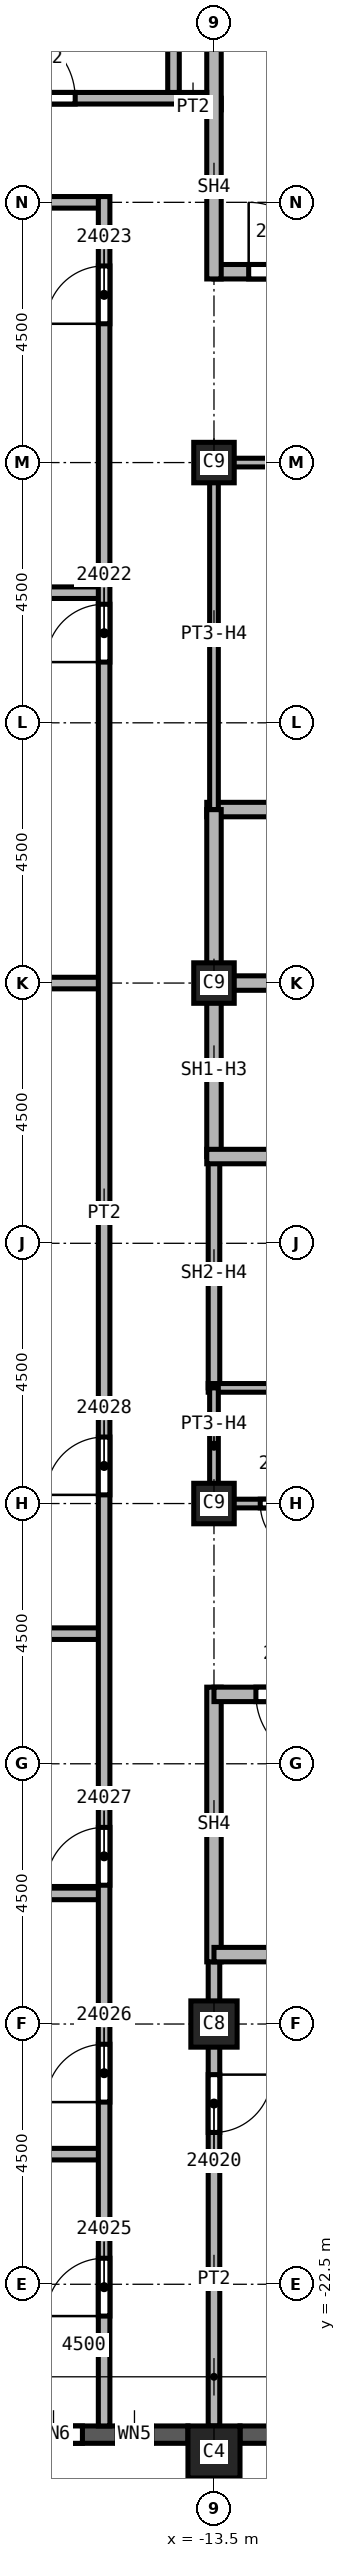
"""IFC4 building model, lengths in metres.
Left out: names, types, materials, properties, quantities, classifications, styles, units other than length and angle.
Written with IfcOpenShell. Run it as: python <this file> out.ifc"""

import sys

from ifc_helpers import new_model, si_unit, direction, frame, frame_2d, origin, origin_2d, place, context, subcontext, project, spatial, rectangle, extrude, element, fill, save


model = new_model("IFC4")
c1 = context("Model", 3, precision=1e-05, world=origin(), true_north=direction((0.0, 1.0)))
c2 = subcontext(c1, "Body", "Model", "MODEL_VIEW")
j1 = project(units=[si_unit("LENGTHUNIT", "METRE"), si_unit("PLANEANGLEUNIT", "RADIAN")], contexts=[c1])
p1 = place(None, origin())
s1 = spatial("IfcSite", under=j1, at=p1, CompositionType="ELEMENT")
p2 = place(p1, origin())
s2 = spatial("IfcBuilding", under=s1, at=p2, CompositionType="ELEMENT")
p3 = place(p2, frame((0.0, 0.0, 342.0)))
s3 = spatial("IfcBuildingStorey", under=s2, at=p3, CompositionType="ELEMENT", Elevation=342.0)
p4 = place(p3, frame((-13.5, -18.0, 0.0), z_axis=(0.0, 0.0, 1.0), x_axis=(1.0, 0.0, 0.0)))
e1 = element("IfcColumn", 1, at=p4, inside=s3, PredefinedType="COLUMN", context=c2, shape_type="SweptSolid", body=[
    extrude(rectangle(XDim=0.8, YDim=0.8, at=origin_2d()), origin(), (0.0, 0.0, 1.0), 3.74),
])
for number, where, z_axis, x_axis in (
    (2, (-13.5, 0.0, 0.0), (0.0, 0.0, 1.0), (1.0, 0.0, 0.0)),
    (3, (-13.5, 9.0, 0.0), (0.0, 0.0, 1.0), (1.0, 0.0, 0.0)),
    (4, (-13.5, -9.0, 0.0), (0.0, 0.0, 1.0), (1.0, 0.0, 0.0)),
):
    element("IfcColumn", number, at=place(p3, frame(where, z_axis=z_axis, x_axis=x_axis)), inside=s3, PredefinedType="COLUMN", context=c2, shape_type="SweptSolid", body=[
        extrude(rectangle(XDim=0.7, YDim=0.7, at=origin_2d()), origin(), (0.0, 0.0, 1.0), 3.74),
    ])
p5 = place(p3, frame((-13.5, -25.4, 0.0), z_axis=(0.0, 0.0, 1.0), x_axis=(1.0, 0.0, 0.0)))
e5 = element("IfcColumn", 5, at=p5, inside=s3, PredefinedType="COLUMN", context=c2, shape_type="SweptSolid", body=[
    extrude(rectangle(XDim=0.9, YDim=0.9, at=origin_2d()), origin(), (0.0, 0.0, 1.0), 3.74),
])
p6 = place(p3, frame((-17.55, -25.1, 0.0), z_axis=(0.0, 0.0, 1.0), x_axis=(1.0, 0.0, 0.0)))
e6 = element("IfcWall", 6, at=p6, inside=s3, PredefinedType="SOLIDWALL", context=c2, shape_type="SweptSolid", body=[
    extrude(rectangle(XDim=3.6, YDim=0.3, at=frame_2d((1.8, 0.0))), origin(), (0.0, 0.0, 1.0), 3.14),
])
p7 = place(p6, frame((0.775, 0.0, 0.8)))
e7 = element("IfcOpeningElement", 7, at=p7, cuts=e6, PredefinedType="OPENING", context=c2, shape_type="SweptSolid", body=[
    extrude(rectangle(XDim=1.0, YDim=1.95, at=frame_2d((0.5, 0.975))), frame((0.0, 0.15, 0.0), z_axis=(0.0, -1.0, 0.0), x_axis=(1.0, 0.0, 0.0)), (0.0, 0.0, 1.0), 0.3),
])
p8 = place(p6, frame((2.375, 0.0, 0.8)))
e8 = element("IfcOpeningElement", 8, at=p8, cuts=e6, PredefinedType="OPENING", context=c2, shape_type="SweptSolid", body=[
    extrude(rectangle(XDim=0.6, YDim=1.95, at=frame_2d((0.3, 0.975))), frame((0.0, 0.15, 0.0), z_axis=(0.0, -1.0, 0.0), x_axis=(1.0, 0.0, 0.0)), (0.0, 0.0, 1.0), 0.3),
])
p9 = place(p3, frame((-13.05, -25.1, 0.0), z_axis=(0.0, 0.0, 1.0), x_axis=(1.0, 0.0, 0.0)))
e9 = element("IfcWall", 9, at=p9, inside=s3, PredefinedType="SOLIDWALL", context=c2, shape_type="SweptSolid", body=[
    extrude(rectangle(XDim=3.6, YDim=0.3, at=frame_2d((1.8, 0.0))), origin(), (0.0, 0.0, 1.0), 3.14),
])
p10 = place(p9, frame((0.6, 0.0, 0.8)))
e10 = element("IfcOpeningElement", 10, at=p10, cuts=e9, PredefinedType="OPENING", context=c2, shape_type="SweptSolid", body=[
    extrude(rectangle(XDim=2.4, YDim=1.95, at=frame_2d((1.2, 0.975))), frame((0.0, 0.15, 0.0), z_axis=(0.0, -1.0, 0.0), x_axis=(1.0, 0.0, 0.0)), (0.0, 0.0, 1.0), 0.3),
])
for number, where, z_axis, x_axis in (
    (11, (-26.55, -15.75, 0.0), (0.0, 0.0, 1.0), (1.0, 0.0, 0.0)),
    (12, (-26.55, -11.25, 0.0), (0.0, 0.0, 1.0), (1.0, 0.0, 0.0)),
):
    element("IfcWall", number, at=place(p3, frame(where, z_axis=z_axis, x_axis=x_axis)), inside=s3, PredefinedType="PARTITIONING", context=c2, shape_type="SweptSolid", body=[
        extrude(rectangle(XDim=11.15, YDim=0.2, at=frame_2d((5.575, 0.0))), origin(), (0.0, 0.0, 1.0), 3.74),
    ])
p11 = place(p3, frame((-24.3, -20.25, 0.0), z_axis=(0.0, 0.0, 1.0), x_axis=(1.0, 0.0, 0.0)))
e13 = element("IfcWall", 13, at=p11, inside=s3, PredefinedType="PARTITIONING", context=c2, shape_type="SweptSolid", body=[
    extrude(rectangle(XDim=8.9, YDim=0.2, at=frame_2d((4.45, 0.0))), origin(), (0.0, 0.0, 1.0), 3.74),
])
p12 = place(p3, frame((-15.4, 0.0, 0.0), z_axis=(0.0, 0.0, 1.0), x_axis=(-1.0, 0.0, 0.0)))
e14 = element("IfcWall", 14, at=p12, inside=s3, PredefinedType="PARTITIONING", context=c2, shape_type="SweptSolid", body=[
    extrude(rectangle(XDim=11.15, YDim=0.2, at=frame_2d((5.575, 0.0))), origin(), (0.0, 0.0, 1.0), 3.74),
])
p13 = place(p3, frame((-20.0, 6.75, 0.0), z_axis=(0.0, 0.0, 1.0), x_axis=(1.0, 0.0, 0.0)))
e15 = element("IfcWall", 15, at=p13, inside=s3, PredefinedType="PARTITIONING", context=c2, shape_type="SweptSolid", body=[
    extrude(rectangle(XDim=4.6, YDim=0.2, at=frame_2d((2.3, 0.0))), origin(), (0.0, 0.0, 1.0), 3.74),
])
p14 = place(p3, frame((-15.4, 13.5, 0.0), z_axis=(0.0, 0.0, 1.0), x_axis=(-1.0, 0.0, 0.0)))
e16 = element("IfcWall", 16, at=p14, inside=s3, PredefinedType="PARTITIONING", context=c2, shape_type="SweptSolid", body=[
    extrude(rectangle(XDim=6.6, YDim=0.2, at=frame_2d((3.3, 0.0))), origin(), (0.0, 0.0, 1.0), 3.74),
])
p15 = place(p3, frame((-15.4, -24.95, 0.0), z_axis=(0.0, 0.0, 1.0), x_axis=(0.0, 1.0, 0.0)))
e17 = element("IfcWall", 17, at=p15, inside=s3, PredefinedType="PARTITIONING", context=c2, shape_type="SweptSolid", body=[
    extrude(rectangle(XDim=38.55, YDim=0.2, at=frame_2d((19.275, 0.0))), origin(), (0.0, 0.0, 1.0), 3.74),
])
p16 = place(p15, frame((30.5, 0.0, 0.0)))
e18 = element("IfcOpeningElement", 18, at=p16, cuts=e17, PredefinedType="OPENING", context=c2, shape_type="SweptSolid", body=[
    extrude(rectangle(XDim=1.0, YDim=2.1, at=frame_2d((0.5, 1.05))), frame((0.0, 0.1, 0.0), z_axis=(0.0, -1.0, 0.0), x_axis=(1.0, 0.0, 0.0)), (0.0, 0.0, 1.0), 0.2),
])
p17 = place(p15, frame((36.35, 0.0, 0.0)))
e19 = element("IfcOpeningElement", 19, at=p17, cuts=e17, PredefinedType="OPENING", context=c2, shape_type="SweptSolid", body=[
    extrude(rectangle(XDim=1.0, YDim=2.1, at=frame_2d((0.5, 1.05))), frame((0.0, 0.1, 0.0), z_axis=(0.0, -1.0, 0.0), x_axis=(1.0, 0.0, 0.0)), (0.0, 0.0, 1.0), 0.2),
])
p18 = place(p15, frame((1.9, 0.0, 0.0)))
e20 = element("IfcOpeningElement", 20, at=p18, cuts=e17, PredefinedType="OPENING", context=c2, shape_type="SweptSolid", body=[
    extrude(rectangle(XDim=1.0, YDim=2.1, at=frame_2d((0.5, 1.05))), frame((0.0, 0.1, 0.0), z_axis=(0.0, -1.0, 0.0), x_axis=(1.0, 0.0, 0.0)), (0.0, 0.0, 1.0), 0.2),
])
p19 = place(p15, frame((5.6, 0.0, 0.0)))
e21 = element("IfcOpeningElement", 21, at=p19, cuts=e17, PredefinedType="OPENING", context=c2, shape_type="SweptSolid", body=[
    extrude(rectangle(XDim=1.0, YDim=2.1, at=frame_2d((0.5, 1.05))), frame((0.0, 0.1, 0.0), z_axis=(0.0, -1.0, 0.0), x_axis=(1.0, 0.0, 0.0)), (0.0, 0.0, 1.0), 0.2),
])
p20 = place(p15, frame((9.35, 0.0, 0.0)))
e22 = element("IfcOpeningElement", 22, at=p20, cuts=e17, PredefinedType="OPENING", context=c2, shape_type="SweptSolid", body=[
    extrude(rectangle(XDim=1.0, YDim=2.1, at=frame_2d((0.5, 1.05))), frame((0.0, 0.1, 0.0), z_axis=(0.0, -1.0, 0.0), x_axis=(1.0, 0.0, 0.0)), (0.0, 0.0, 1.0), 0.2),
])
p21 = place(p15, frame((16.1, 0.0, 0.0)))
e23 = element("IfcOpeningElement", 23, at=p21, cuts=e17, PredefinedType="OPENING", context=c2, shape_type="SweptSolid", body=[
    extrude(rectangle(XDim=1.0, YDim=2.1, at=frame_2d((0.5, 1.05))), frame((0.0, 0.1, 0.0), z_axis=(0.0, -1.0, 0.0), x_axis=(1.0, 0.0, 0.0)), (0.0, 0.0, 1.0), 0.2),
])
p22 = place(p3, frame((-14.1, 15.2, 0.0), z_axis=(0.0, 0.0, 1.0), x_axis=(1.0, 0.0, 0.0)))
e24 = element("IfcWall", 24, at=p22, inside=s3, PredefinedType="PARTITIONING", context=c2, shape_type="SweptSolid", body=[
    extrude(rectangle(XDim=0.725, YDim=0.2, at=frame_2d((0.363, 0.0))), origin(), (0.0, 0.0, 1.0), 3.74),
])
p23 = place(p3, frame((-13.5, -16.675, 0.0), z_axis=(0.0, 0.0, 1.0), x_axis=(0.0, -1.0, 0.0)))
e25 = element("IfcWall", 25, at=p23, inside=s3, PredefinedType="PARTITIONING", context=c2, shape_type="SweptSolid", body=[
    extrude(rectangle(XDim=8.275, YDim=0.2, at=frame_2d((4.137, 0.0))), origin(), (0.0, 0.0, 1.0), 3.74),
])
p24 = place(p23, frame((2.2, 0.0, 0.0)))
e26 = element("IfcOpeningElement", 26, at=p24, cuts=e25, PredefinedType="OPENING", context=c2, shape_type="SweptSolid", body=[
    extrude(rectangle(XDim=1.0, YDim=2.1, at=frame_2d((0.5, 1.05))), frame((0.0, 0.1, 0.0), z_axis=(0.0, -1.0, 0.0), x_axis=(1.0, 0.0, 0.0)), (0.0, 0.0, 1.0), 0.2),
])
p25 = place(p3, frame((-13.5, -7.0, 0.0), z_axis=(0.0, 0.0, 1.0), x_axis=(0.0, 1.0, 0.0)))
e27 = element("IfcWall", 27, at=p25, inside=s3, PredefinedType="SOLIDWALL", context=c2, shape_type="SweptSolid", body=[
    extrude(rectangle(XDim=4.0, YDim=0.2, at=frame_2d((2.0, 0.0))), origin(), (0.0, 0.0, 1.0), 3.062),
])
p26 = place(p3, frame((-13.625, 0.0, 0.0), z_axis=(0.0, 0.0, 1.0), x_axis=(1.0, 0.0, 0.0)))
e28 = element("IfcWall", 28, at=p26, inside=s3, PredefinedType="SOLIDWALL", context=c2, shape_type="SweptSolid", body=[
    extrude(rectangle(XDim=3.125, YDim=0.25, at=frame_2d((1.562, 0.0))), origin(), (0.0, 0.0, 1.0), 3.74),
])
p27 = place(p3, frame((-13.625, 3.0, 0.0), z_axis=(0.0, 0.0, 1.0), x_axis=(1.0, 0.0, 0.0)))
e29 = element("IfcWall", 29, at=p27, inside=s3, PredefinedType="SOLIDWALL", context=c2, shape_type="SweptSolid", body=[
    extrude(rectangle(XDim=6.125, YDim=0.25, at=frame_2d((3.062, 0.0))), origin(), (0.0, 0.0, 1.0), 3.74),
])
p28 = place(p27, frame((4.0, 0.0, 0.0)))
e30 = element("IfcOpeningElement", 30, at=p28, cuts=e29, PredefinedType="OPENING", context=c2, shape_type="SweptSolid", body=[
    extrude(rectangle(XDim=1.1, YDim=2.1, at=frame_2d((0.55, 1.05))), frame((0.0, 0.125, 0.0), z_axis=(0.0, -1.0, 0.0), x_axis=(1.0, 0.0, 0.0)), (0.0, 0.0, 1.0), 0.25),
])
p29 = place(p3, frame((-13.5, -3.0, 0.0), z_axis=(0.0, 0.0, 1.0), x_axis=(0.0, 1.0, 0.0)))
e31 = element("IfcWall", 31, at=p29, inside=s3, PredefinedType="SOLIDWALL", context=c2, shape_type="SweptSolid", body=[
    extrude(rectangle(XDim=6.0, YDim=0.25, at=frame_2d((3.0, 0.0))), origin(), (0.0, 0.0, 1.0), 3.062),
])
p30 = place(p3, frame((-13.625, -3.0, 0.0), z_axis=(0.0, 0.0, 1.0), x_axis=(1.0, 0.0, 0.0)))
e32 = element("IfcWall", 32, at=p30, inside=s3, PredefinedType="SOLIDWALL", context=c2, shape_type="SweptSolid", body=[
    extrude(rectangle(XDim=6.125, YDim=0.25, at=frame_2d((3.062, 0.0))), origin(), (0.0, 0.0, 1.0), 3.74),
])
p31 = place(p30, frame((4.0, 0.0, 0.0)))
e33 = element("IfcOpeningElement", 33, at=p31, cuts=e32, PredefinedType="OPENING", context=c2, shape_type="SweptSolid", body=[
    extrude(rectangle(XDim=1.1, YDim=2.1, at=frame_2d((0.55, 1.05))), frame((0.0, 0.125, 0.0), z_axis=(0.0, -1.0, 0.0), x_axis=(1.0, 0.0, 0.0)), (0.0, 0.0, 1.0), 0.25),
])
p32 = place(p3, frame((-13.5, -12.175, 0.0), z_axis=(0.0, 0.0, 1.0), x_axis=(0.0, -1.0, 0.0)))
e34 = element("IfcWall", 34, at=p32, inside=s3, PredefinedType="SOLIDWALL", context=c2, shape_type="SweptSolid", body=[
    extrude(rectangle(XDim=4.75, YDim=0.25, at=frame_2d((2.375, 0.0))), origin(), (0.0, 0.0, 1.0), 3.74),
])
p33 = place(p3, frame((-13.5, 12.3, 0.0), z_axis=(0.0, 0.0, 1.0), x_axis=(1.0, 0.0, 0.0)))
e35 = element("IfcWall", 35, at=p33, inside=s3, PredefinedType="SOLIDWALL", context=c2, shape_type="SweptSolid", body=[
    extrude(rectangle(XDim=9.125, YDim=0.25, at=frame_2d((4.562, 0.0))), origin(), (0.0, 0.0, 1.0), 3.74),
])
p34 = place(p33, frame((0.6, 0.0, 0.0)))
e36 = element("IfcOpeningElement", 36, at=p34, cuts=e35, PredefinedType="OPENING", context=c2, shape_type="SweptSolid", body=[
    extrude(rectangle(XDim=1.2, YDim=2.1, at=frame_2d((0.6, 1.05))), frame((0.0, 0.125, 0.0), z_axis=(0.0, -1.0, 0.0), x_axis=(1.0, 0.0, 0.0)), (0.0, 0.0, 1.0), 0.25),
])
p35 = place(p3, frame((-13.5, 12.175, 0.0), z_axis=(0.0, 0.0, 1.0), x_axis=(0.0, 1.0, 0.0)))
e37 = element("IfcWall", 37, at=p35, inside=s3, PredefinedType="SOLIDWALL", context=c2, shape_type="SweptSolid", body=[
    extrude(rectangle(XDim=4.75, YDim=0.25, at=frame_2d((2.375, 0.0))), origin(), (0.0, 0.0, 1.0), 3.74),
])
p36 = place(p3, frame((-4.5, -16.8, 0.0), z_axis=(0.0, 0.0, 1.0), x_axis=(-1.0, 0.0, 0.0)))
e38 = element("IfcWall", 38, at=p36, inside=s3, PredefinedType="SOLIDWALL", context=c2, shape_type="SweptSolid", body=[
    extrude(rectangle(XDim=9.0, YDim=0.25, at=frame_2d((4.5, 0.0))), origin(), (0.0, 0.0, 1.0), 3.74),
])
p37 = place(p3, frame((-4.375, -12.3, 0.0), z_axis=(0.0, 0.0, 1.0), x_axis=(-1.0, 0.0, 0.0)))
e39 = element("IfcWall", 39, at=p37, inside=s3, PredefinedType="SOLIDWALL", context=c2, shape_type="SweptSolid", body=[
    extrude(rectangle(XDim=9.125, YDim=0.25, at=frame_2d((4.562, 0.0))), origin(), (0.0, 0.0, 1.0), 3.74),
])
p38 = place(p37, frame((7.2, 0.0, 0.0)))
e40 = element("IfcOpeningElement", 40, at=p38, cuts=e39, PredefinedType="OPENING", context=c2, shape_type="SweptSolid", body=[
    extrude(rectangle(XDim=1.2, YDim=2.1, at=frame_2d((0.6, 1.05))), frame((0.0, 0.125, 0.0), z_axis=(0.0, -1.0, 0.0), x_axis=(1.0, 0.0, 0.0)), (0.0, 0.0, 1.0), 0.25),
])
p39 = place(p3, frame((-13.6, -7.0, 0.0), z_axis=(0.0, 0.0, 1.0), x_axis=(1.0, 0.0, 0.0)))
e41 = element("IfcWall", 41, at=p39, inside=s3, PredefinedType="PARTITIONING", context=c2, shape_type="SweptSolid", body=[
    extrude(rectangle(XDim=3.1, YDim=0.15, at=frame_2d((1.55, 0.0))), origin(), (0.0, 0.0, 1.0), 3.74),
])
p40 = place(p3, frame((-13.5, -9.075, 0.0), z_axis=(0.0, 0.0, 1.0), x_axis=(0.0, 1.0, 0.0)))
e42 = element("IfcWall", 42, at=p40, inside=s3, PredefinedType="PARTITIONING", context=c2, shape_type="SweptSolid", body=[
    extrude(rectangle(XDim=2.075, YDim=0.15, at=frame_2d((1.038, 0.0))), origin(), (0.0, 0.0, 1.0), 3.062),
])
p41 = place(p3, frame((-13.5, 3.0, 0.0), z_axis=(0.0, 0.0, 1.0), x_axis=(0.0, 1.0, 0.0)))
e43 = element("IfcWall", 43, at=p41, inside=s3, PredefinedType="PARTITIONING", context=c2, shape_type="SweptSolid", body=[
    extrude(rectangle(XDim=6.075, YDim=0.15, at=frame_2d((3.038, 0.0))), origin(), (0.0, 0.0, 1.0), 3.062),
])
p42 = place(p3, frame((-13.5, 9.0, 0.0), z_axis=(0.0, 0.0, 1.0), x_axis=(1.0, 0.0, 0.0)))
e44 = element("IfcWall", 44, at=p42, inside=s3, PredefinedType="PARTITIONING", context=c2, shape_type="SweptSolid", body=[
    extrude(rectangle(XDim=3.0, YDim=0.15, at=frame_2d((1.5, 0.0))), origin(), (0.0, 0.0, 1.0), 3.062),
])
p43 = place(p3, frame((-10.5, -9.0, 0.0), z_axis=(0.0, 0.0, 1.0), x_axis=(-1.0, 0.0, 0.0)))
e45 = element("IfcWall", 45, at=p43, inside=s3, PredefinedType="PARTITIONING", context=c2, shape_type="SweptSolid", body=[
    extrude(rectangle(XDim=3.0, YDim=0.15, at=frame_2d((1.5, 0.0))), origin(), (0.0, 0.0, 1.0), 3.062),
])
p44 = place(p43, frame((1.3, 0.0, 0.0)))
e46 = element("IfcOpeningElement", 46, at=p44, cuts=e45, PredefinedType="OPENING", context=c2, shape_type="SweptSolid", body=[
    extrude(rectangle(XDim=0.9, YDim=2.1, at=frame_2d((0.45, 1.05))), frame((0.0, 0.075, 0.0), z_axis=(0.0, -1.0, 0.0), x_axis=(1.0, 0.0, 0.0)), (0.0, 0.0, 1.0), 0.15),
])
p45 = place(p3, frame((-21.9, 15.3, 0.0), z_axis=(0.0, 0.0, 1.0), x_axis=(1.0, 0.0, 0.0)))
e47 = element("IfcWall", 47, at=p45, inside=s3, PredefinedType="SOLIDWALL", context=c2, shape_type="SweptSolid", body=[
    extrude(rectangle(XDim=8.275, YDim=0.2, at=frame_2d((4.137, 0.0))), origin(), (0.0, 0.0, 1.0), 3.74),
])
p46 = place(p45, frame((4.8, 0.0, 0.0)))
e48 = element("IfcOpeningElement", 48, at=p46, cuts=e47, PredefinedType="OPENING", context=c2, shape_type="SweptSolid", body=[
    extrude(rectangle(XDim=1.2, YDim=2.1, at=frame_2d((0.6, 1.05))), frame((0.0, 0.1, 0.0), z_axis=(0.0, -1.0, 0.0), x_axis=(1.0, 0.0, 0.0)), (0.0, 0.0, 1.0), 0.2),
])
p47 = place(p3, frame((-14.2, 15.4, 0.0), z_axis=(0.0, 0.0, 1.0), x_axis=(0.0, 1.0, 0.0)))
e49 = element("IfcWall", 49, at=p47, inside=s3, PredefinedType="SOLIDWALL", context=c2, shape_type="SweptSolid", body=[
    extrude(rectangle(XDim=5.9, YDim=0.2, at=frame_2d((2.95, 0.0))), origin(), (0.0, 0.0, 1.0), 3.74),
])
p48 = place(p44, origin())
e50 = element("IfcDoor", 50, at=p48, inside=s3, OperationType="SINGLE_SWING_RIGHT", PredefinedType="DOOR", context=c2, shape_type="SweptSolid", body=[
    extrude(rectangle(XDim=0.9, YDim=2.1, at=frame_2d((0.45, 1.05))), frame((0.0, 0.025, 0.0), z_axis=(0.0, -1.0, 0.0), x_axis=(1.0, 0.0, 0.0)), (0.0, 0.0, 1.0), 0.05),
])
fill(e46, e50)
p49 = place(p34, origin())
e51 = element("IfcDoor", 51, at=p49, inside=s3, OperationType="SINGLE_SWING_LEFT", PredefinedType="DOOR", context=c2, shape_type="SweptSolid", body=[
    extrude(rectangle(XDim=1.2, YDim=2.1, at=frame_2d((0.6, 1.05))), frame((0.0, 0.025, 0.0), z_axis=(0.0, -1.0, 0.0), x_axis=(1.0, 0.0, 0.0)), (0.0, 0.0, 1.0), 0.05),
])
fill(e36, e51)
p50 = place(p38, origin())
e52 = element("IfcDoor", 52, at=p50, inside=s3, OperationType="SINGLE_SWING_RIGHT", PredefinedType="DOOR", context=c2, shape_type="SweptSolid", body=[
    extrude(rectangle(XDim=1.2, YDim=2.1, at=frame_2d((0.6, 1.05))), frame((0.0, 0.025, 0.0), z_axis=(0.0, -1.0, 0.0), x_axis=(1.0, 0.0, 0.0)), (0.0, 0.0, 1.0), 0.05),
])
fill(e40, e52)
p51 = place(p24, origin())
e53 = element("IfcDoor", 53, at=p51, inside=s3, OperationType="SINGLE_SWING_LEFT", PredefinedType="DOOR", context=c2, shape_type="SweptSolid", body=[
    extrude(rectangle(XDim=1.0, YDim=2.1, at=frame_2d((0.5, 1.05))), frame((0.0, 0.025, 0.0), z_axis=(0.0, -1.0, 0.0), x_axis=(1.0, 0.0, 0.0)), (0.0, 0.0, 1.0), 0.05),
])
fill(e26, e53)
p52 = place(p16, origin())
e54 = element("IfcDoor", 54, at=p52, inside=s3, OperationType="SINGLE_SWING_LEFT", PredefinedType="DOOR", context=c2, shape_type="SweptSolid", body=[
    extrude(rectangle(XDim=1.0, YDim=2.1, at=frame_2d((0.5, 1.05))), frame((0.0, 0.025, 0.0), z_axis=(0.0, -1.0, 0.0), x_axis=(1.0, 0.0, 0.0)), (0.0, 0.0, 1.0), 0.05),
])
fill(e18, e54)
p53 = place(p17, origin())
e55 = element("IfcDoor", 55, at=p53, inside=s3, OperationType="SINGLE_SWING_RIGHT", PredefinedType="DOOR", context=c2, shape_type="SweptSolid", body=[
    extrude(rectangle(XDim=1.0, YDim=2.1, at=frame_2d((0.5, 1.05))), frame((0.0, 0.025, 0.0), z_axis=(0.0, -1.0, 0.0), x_axis=(1.0, 0.0, 0.0)), (0.0, 0.0, 1.0), 0.05),
])
fill(e19, e55)
p54 = place(p18, origin())
e56 = element("IfcDoor", 56, at=p54, inside=s3, OperationType="SINGLE_SWING_RIGHT", PredefinedType="DOOR", context=c2, shape_type="SweptSolid", body=[
    extrude(rectangle(XDim=1.0, YDim=2.1, at=frame_2d((0.5, 1.05))), frame((0.0, 0.025, 0.0), z_axis=(0.0, -1.0, 0.0), x_axis=(1.0, 0.0, 0.0)), (0.0, 0.0, 1.0), 0.05),
])
fill(e20, e56)
p55 = place(p19, origin())
e57 = element("IfcDoor", 57, at=p55, inside=s3, OperationType="SINGLE_SWING_LEFT", PredefinedType="DOOR", context=c2, shape_type="SweptSolid", body=[
    extrude(rectangle(XDim=1.0, YDim=2.1, at=frame_2d((0.5, 1.05))), frame((0.0, 0.025, 0.0), z_axis=(0.0, -1.0, 0.0), x_axis=(1.0, 0.0, 0.0)), (0.0, 0.0, 1.0), 0.05),
])
fill(e21, e57)
p56 = place(p20, origin())
e58 = element("IfcDoor", 58, at=p56, inside=s3, OperationType="SINGLE_SWING_RIGHT", PredefinedType="DOOR", context=c2, shape_type="SweptSolid", body=[
    extrude(rectangle(XDim=1.0, YDim=2.1, at=frame_2d((0.5, 1.05))), frame((0.0, 0.025, 0.0), z_axis=(0.0, -1.0, 0.0), x_axis=(1.0, 0.0, 0.0)), (0.0, 0.0, 1.0), 0.05),
])
fill(e22, e58)
p57 = place(p21, origin())
e59 = element("IfcDoor", 59, at=p57, inside=s3, OperationType="SINGLE_SWING_LEFT", PredefinedType="DOOR", context=c2, shape_type="SweptSolid", body=[
    extrude(rectangle(XDim=1.0, YDim=2.1, at=frame_2d((0.5, 1.05))), frame((0.0, 0.025, 0.0), z_axis=(0.0, -1.0, 0.0), x_axis=(1.0, 0.0, 0.0)), (0.0, 0.0, 1.0), 0.05),
])
fill(e23, e59)
p58 = place(p46, origin())
e60 = element("IfcDoor", 60, at=p58, inside=s3, OperationType="SINGLE_SWING_RIGHT", PredefinedType="DOOR", context=c2, shape_type="SweptSolid", body=[
    extrude(rectangle(XDim=1.2, YDim=2.1, at=frame_2d((0.6, 1.05))), frame((0.0, 0.025, 0.0), z_axis=(0.0, -1.0, 0.0), x_axis=(1.0, 0.0, 0.0)), (0.0, 0.0, 1.0), 0.05),
])
fill(e48, e60)
p59 = place(p7, origin())
e61 = element("IfcWindow", 61, at=p59, inside=s3, PartitioningType="SINGLE_PANEL", PredefinedType="WINDOW", context=c2, shape_type="SweptSolid", body=[
    extrude(rectangle(XDim=1.0, YDim=1.95, at=frame_2d((0.5, 0.975))), frame((0.0, 0.03, 0.0), z_axis=(0.0, -1.0, 0.0), x_axis=(1.0, 0.0, 0.0)), (0.0, 0.0, 1.0), 0.06),
])
fill(e7, e61)
p60 = place(p8, origin())
e62 = element("IfcWindow", 62, at=p60, inside=s3, PartitioningType="SINGLE_PANEL", PredefinedType="WINDOW", context=c2, shape_type="SweptSolid", body=[
    extrude(rectangle(XDim=0.6, YDim=1.95, at=frame_2d((0.3, 0.975))), frame((0.0, 0.03, 0.0), z_axis=(0.0, -1.0, 0.0), x_axis=(1.0, 0.0, 0.0)), (0.0, 0.0, 1.0), 0.06),
])
fill(e8, e62)
save(model, sys.argv[1])
